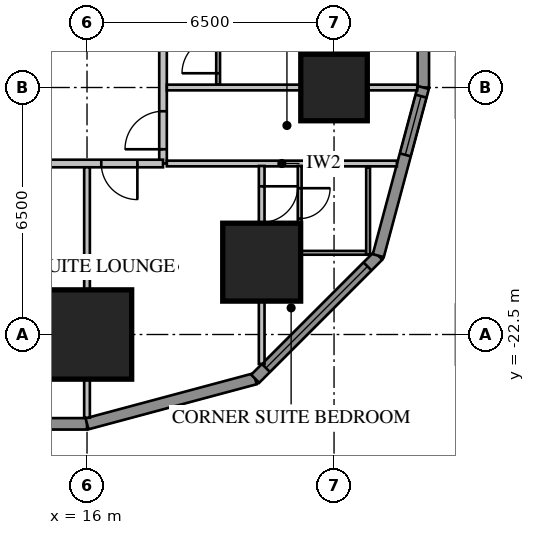
"""IFC4 building model, lengths in metres.
Left out: names, types, materials, properties, quantities, classifications, styles, units other than length and angle.
Written with IfcOpenShell. Run it as: python <this file> out.ifc"""

import sys

from ifc_helpers import new_model, si_unit, direction, frame, frame_2d, origin, origin_2d, place, context, subcontext, project, spatial, rectangle, extrude, element, fill, save


model = new_model("IFC4")
c1 = context("Model", 3, precision=1e-05, world=origin(), true_north=direction((0.0, 1.0)))
c2 = subcontext(c1, "Body", "Model", "MODEL_VIEW")
j1 = project(units=[si_unit("LENGTHUNIT", "METRE"), si_unit("PLANEANGLEUNIT", "RADIAN")], contexts=[c1])
p1 = place(None, origin())
s1 = spatial("IfcSite", under=j1, at=p1, CompositionType="ELEMENT")
p2 = place(p1, origin())
s2 = spatial("IfcBuilding", under=s1, at=p2, CompositionType="ELEMENT")
p3 = place(p2, frame((0.0, 0.0, 42.95)))
s3 = spatial("IfcBuildingStorey", under=s2, at=p3, CompositionType="ELEMENT", Elevation=42.95)
p4 = place(p3, frame((22.5, -16.0, 0.0), z_axis=(0.0, 0.0, 1.0), x_axis=(1.0, 0.0, 0.0)))
e1 = element("IfcColumn", 1, at=p4, inside=s3, PredefinedType="COLUMN", context=c2, shape_type="SweptSolid", body=[
    extrude(rectangle(XDim=1.75, YDim=1.75, at=origin_2d()), origin(), (0.0, 0.0, 1.0), 3.85),
])
p5 = place(p3, frame((16.0, -22.5, 0.0), z_axis=(0.0, 0.0, 1.0), x_axis=(1.0, 0.0, 0.0)))
e2 = element("IfcColumn", 2, at=p5, inside=s3, PredefinedType="COLUMN", context=c2, shape_type="SweptSolid", body=[
    extrude(rectangle(XDim=2.35, YDim=2.35, at=origin_2d()), origin(), (0.0, 0.0, 1.0), 3.85),
])
p6 = place(p3, frame((20.596, -20.596, 0.0), z_axis=(0.0, 0.0, 1.0), x_axis=(1.0, 0.0, 0.0)))
e3 = element("IfcColumn", 3, at=p6, inside=s3, PredefinedType="COLUMN", context=c2, shape_type="SweptSolid", body=[
    extrude(rectangle(XDim=2.05, YDim=2.05, at=origin_2d()), origin(), (0.0, 0.0, 1.0), 3.85),
])
p7 = place(p3, frame((24.85, -16.0, 0.0), z_axis=(0.0, 0.0, 1.0), x_axis=(0.0, 1.0, 0.0)))
e4 = element("IfcWall", 4, at=p7, inside=s3, PredefinedType="SOLIDWALL", context=c2, shape_type="SweptSolid", body=[
    extrude(rectangle(XDim=32.0, YDim=0.3, at=frame_2d((16.0, 0.0))), origin(), (0.0, 0.0, 1.0), 3.65),
])
p8 = place(p7, frame((1.2, 0.0, 0.75)))
e5 = element("IfcOpeningElement", 5, at=p8, cuts=e4, PredefinedType="OPENING", context=c2, shape_type="SweptSolid", body=[
    extrude(rectangle(XDim=1.6, YDim=1.8, at=frame_2d((0.8, 0.9))), frame((0.0, 0.17, 0.0), z_axis=(0.0, -1.0, 0.0), x_axis=(1.0, 0.0, 0.0)), (0.0, 0.0, 1.0), 0.34),
])
p9 = place(p7, frame((5.2, 0.0, 0.75)))
e6 = element("IfcOpeningElement", 6, at=p9, cuts=e4, PredefinedType="OPENING", context=c2, shape_type="SweptSolid", body=[
    extrude(rectangle(XDim=1.6, YDim=1.8, at=frame_2d((0.8, 0.9))), frame((0.0, 0.17, 0.0), z_axis=(0.0, -1.0, 0.0), x_axis=(1.0, 0.0, 0.0)), (0.0, 0.0, 1.0), 0.34),
])
p10 = place(p7, frame((17.2, 0.0, 0.75)))
e7 = element("IfcOpeningElement", 7, at=p10, cuts=e4, PredefinedType="OPENING", context=c2, shape_type="SweptSolid", body=[
    extrude(rectangle(XDim=1.6, YDim=1.8, at=frame_2d((0.8, 0.9))), frame((0.0, 0.17, 0.0), z_axis=(0.0, -1.0, 0.0), x_axis=(1.0, 0.0, 0.0)), (0.0, 0.0, 1.0), 0.34),
])
p11 = place(p7, frame((21.2, 0.0, 0.75)))
e8 = element("IfcOpeningElement", 8, at=p11, cuts=e4, PredefinedType="OPENING", context=c2, shape_type="SweptSolid", body=[
    extrude(rectangle(XDim=1.6, YDim=1.8, at=frame_2d((0.8, 0.9))), frame((0.0, 0.17, 0.0), z_axis=(0.0, -1.0, 0.0), x_axis=(1.0, 0.0, 0.0)), (0.0, 0.0, 1.0), 0.34),
])
p12 = place(p7, frame((25.2, 0.0, 0.75)))
e9 = element("IfcOpeningElement", 9, at=p12, cuts=e4, PredefinedType="OPENING", context=c2, shape_type="SweptSolid", body=[
    extrude(rectangle(XDim=1.6, YDim=1.8, at=frame_2d((0.8, 0.9))), frame((0.0, 0.17, 0.0), z_axis=(0.0, -1.0, 0.0), x_axis=(1.0, 0.0, 0.0)), (0.0, 0.0, 1.0), 0.34),
])
p13 = place(p7, frame((29.2, 0.0, 0.75)))
e10 = element("IfcOpeningElement", 10, at=p13, cuts=e4, PredefinedType="OPENING", context=c2, shape_type="SweptSolid", body=[
    extrude(rectangle(XDim=1.6, YDim=1.8, at=frame_2d((0.8, 0.9))), frame((0.0, 0.17, 0.0), z_axis=(0.0, -1.0, 0.0), x_axis=(1.0, 0.0, 0.0)), (0.0, 0.0, 1.0), 0.34),
])
p14 = place(p7, frame((8.8, 0.0, 0.75)))
e11 = element("IfcOpeningElement", 11, at=p14, cuts=e4, PredefinedType="OPENING", context=c2, shape_type="SweptSolid", body=[
    extrude(rectangle(XDim=2.4, YDim=1.8, at=frame_2d((1.2, 0.9))), frame((0.0, 0.17, 0.0), z_axis=(0.0, -1.0, 0.0), x_axis=(1.0, 0.0, 0.0)), (0.0, 0.0, 1.0), 0.34),
])
p15 = place(p7, frame((13.812, 0.0, 0.0)))
e12 = element("IfcOpeningElement", 12, at=p15, cuts=e4, PredefinedType="OPENING", context=c2, shape_type="SweptSolid", body=[
    extrude(rectangle(XDim=1.0, YDim=2.4, at=frame_2d((0.5, 1.2))), frame((0.0, 0.17, 0.0), z_axis=(0.0, -1.0, 0.0), x_axis=(1.0, 0.0, 0.0)), (0.0, 0.0, 1.0), 0.34),
])
p16 = place(p3, frame((-16.0, -24.85, 0.0), z_axis=(0.0, 0.0, 1.0), x_axis=(1.0, 0.0, 0.0)))
e13 = element("IfcWall", 13, at=p16, inside=s3, PredefinedType="SOLIDWALL", context=c2, shape_type="SweptSolid", body=[
    extrude(rectangle(XDim=32.0, YDim=0.3, at=frame_2d((16.0, 0.0))), origin(), (0.0, 0.0, 1.0), 3.65),
])
p17 = place(p16, frame((1.2, 0.0, 0.75)))
e14 = element("IfcOpeningElement", 14, at=p17, cuts=e13, PredefinedType="OPENING", context=c2, shape_type="SweptSolid", body=[
    extrude(rectangle(XDim=1.6, YDim=1.8, at=frame_2d((0.8, 0.9))), frame((0.0, 0.17, 0.0), z_axis=(0.0, -1.0, 0.0), x_axis=(1.0, 0.0, 0.0)), (0.0, 0.0, 1.0), 0.34),
])
p18 = place(p16, frame((5.2, 0.0, 0.75)))
e15 = element("IfcOpeningElement", 15, at=p18, cuts=e13, PredefinedType="OPENING", context=c2, shape_type="SweptSolid", body=[
    extrude(rectangle(XDim=1.6, YDim=1.8, at=frame_2d((0.8, 0.9))), frame((0.0, 0.17, 0.0), z_axis=(0.0, -1.0, 0.0), x_axis=(1.0, 0.0, 0.0)), (0.0, 0.0, 1.0), 0.34),
])
p19 = place(p16, frame((17.2, 0.0, 0.75)))
e16 = element("IfcOpeningElement", 16, at=p19, cuts=e13, PredefinedType="OPENING", context=c2, shape_type="SweptSolid", body=[
    extrude(rectangle(XDim=1.6, YDim=1.8, at=frame_2d((0.8, 0.9))), frame((0.0, 0.17, 0.0), z_axis=(0.0, -1.0, 0.0), x_axis=(1.0, 0.0, 0.0)), (0.0, 0.0, 1.0), 0.34),
])
p20 = place(p16, frame((21.2, 0.0, 0.75)))
e17 = element("IfcOpeningElement", 17, at=p20, cuts=e13, PredefinedType="OPENING", context=c2, shape_type="SweptSolid", body=[
    extrude(rectangle(XDim=1.6, YDim=1.8, at=frame_2d((0.8, 0.9))), frame((0.0, 0.17, 0.0), z_axis=(0.0, -1.0, 0.0), x_axis=(1.0, 0.0, 0.0)), (0.0, 0.0, 1.0), 0.34),
])
p21 = place(p16, frame((25.2, 0.0, 0.75)))
e18 = element("IfcOpeningElement", 18, at=p21, cuts=e13, PredefinedType="OPENING", context=c2, shape_type="SweptSolid", body=[
    extrude(rectangle(XDim=1.6, YDim=1.8, at=frame_2d((0.8, 0.9))), frame((0.0, 0.17, 0.0), z_axis=(0.0, -1.0, 0.0), x_axis=(1.0, 0.0, 0.0)), (0.0, 0.0, 1.0), 0.34),
])
p22 = place(p16, frame((29.2, 0.0, 0.75)))
e19 = element("IfcOpeningElement", 19, at=p22, cuts=e13, PredefinedType="OPENING", context=c2, shape_type="SweptSolid", body=[
    extrude(rectangle(XDim=1.6, YDim=1.8, at=frame_2d((0.8, 0.9))), frame((0.0, 0.17, 0.0), z_axis=(0.0, -1.0, 0.0), x_axis=(1.0, 0.0, 0.0)), (0.0, 0.0, 1.0), 0.34),
])
p23 = place(p16, frame((8.8, 0.0, 0.75)))
e20 = element("IfcOpeningElement", 20, at=p23, cuts=e13, PredefinedType="OPENING", context=c2, shape_type="SweptSolid", body=[
    extrude(rectangle(XDim=2.4, YDim=1.8, at=frame_2d((1.2, 0.9))), frame((0.0, 0.17, 0.0), z_axis=(0.0, -1.0, 0.0), x_axis=(1.0, 0.0, 0.0)), (0.0, 0.0, 1.0), 0.34),
])
p24 = place(p16, frame((13.812, 0.0, 0.0)))
e21 = element("IfcOpeningElement", 21, at=p24, cuts=e13, PredefinedType="OPENING", context=c2, shape_type="SweptSolid", body=[
    extrude(rectangle(XDim=1.0, YDim=2.4, at=frame_2d((0.5, 1.2))), frame((0.0, 0.17, 0.0), z_axis=(0.0, -1.0, 0.0), x_axis=(1.0, 0.0, 0.0)), (0.0, 0.0, 1.0), 0.34),
])
p25 = place(p3, frame((16.0, -24.85, 0.0), z_axis=(0.0, 0.0, 1.0), x_axis=(0.965920218567, 0.258839972501, 0.0)))
e22 = element("IfcWall", 22, at=p25, inside=s3, PredefinedType="SOLIDWALL", context=c2, shape_type="SweptSolid", body=[
    extrude(rectangle(XDim=4.581, YDim=0.3, at=frame_2d((2.291, 0.0))), origin(), (0.0, 0.0, 1.0), 3.65),
])
p26 = place(p3, frame((20.425, -23.664, 0.0), z_axis=(0.0, 0.0, 1.0), x_axis=(0.707106781187, 0.707106781187, 0.0)))
e23 = element("IfcWall", 23, at=p26, inside=s3, PredefinedType="SOLIDWALL", context=c2, shape_type="SweptSolid", body=[
    extrude(rectangle(XDim=4.581, YDim=0.3, at=frame_2d((2.291, 0.0))), origin(), (0.0, 0.0, 1.0), 3.65),
])
p27 = place(p26, frame((0.4, 0.0, 0.75)))
e24 = element("IfcOpeningElement", 24, at=p27, cuts=e23, PredefinedType="OPENING", context=c2, shape_type="SweptSolid", body=[
    extrude(rectangle(XDim=3.781, YDim=1.8, at=frame_2d((1.891, 0.9))), frame((0.0, 0.17, 0.0), z_axis=(0.0, -1.0, 0.0), x_axis=(1.0, 0.0, 0.0)), (0.0, 0.0, 1.0), 0.34),
])
p28 = place(p3, frame((23.664, -20.425, 0.0), z_axis=(0.0, 0.0, 1.0), x_axis=(0.258839972501, 0.965920218567, 0.0)))
e25 = element("IfcWall", 25, at=p28, inside=s3, PredefinedType="SOLIDWALL", context=c2, shape_type="SweptSolid", body=[
    extrude(rectangle(XDim=4.581, YDim=0.3, at=frame_2d((2.291, 0.0))), origin(), (0.0, 0.0, 1.0), 3.65),
])
p29 = place(p28, frame((2.746, 0.0, 0.75)))
e26 = element("IfcOpeningElement", 26, at=p29, cuts=e25, PredefinedType="OPENING", context=c2, shape_type="SweptSolid", body=[
    extrude(rectangle(XDim=1.6, YDim=1.8, at=frame_2d((0.8, 0.9))), frame((0.0, 0.17, 0.0), z_axis=(0.0, -1.0, 0.0), x_axis=(1.0, 0.0, 0.0)), (0.0, 0.0, 1.0), 0.34),
])
p30 = place(p3, frame((18.0, -18.0, 0.0), z_axis=(0.0, 0.0, 1.0), x_axis=(0.0, 1.0, 0.0)))
e27 = element("IfcWall", 27, at=p30, inside=s3, PredefinedType="PARTITIONING", context=c2, shape_type="SweptSolid", body=[
    extrude(rectangle(XDim=36.0, YDim=0.2, at=frame_2d((18.0, 0.0))), origin(), (0.0, 0.0, 1.0), 3.65),
])
p31 = place(p30, frame((10.4, 0.0, 0.0)))
e28 = element("IfcOpeningElement", 28, at=p31, cuts=e27, PredefinedType="OPENING", context=c2, shape_type="SweptSolid", body=[
    extrude(rectangle(XDim=1.0, YDim=2.1, at=frame_2d((0.5, 1.05))), frame((0.0, 0.12, 0.0), z_axis=(0.0, -1.0, 0.0), x_axis=(1.0, 0.0, 0.0)), (0.0, 0.0, 1.0), 0.24),
])
p32 = place(p30, frame((14.4, 0.0, 0.0)))
e29 = element("IfcOpeningElement", 29, at=p32, cuts=e27, PredefinedType="OPENING", context=c2, shape_type="SweptSolid", body=[
    extrude(rectangle(XDim=1.0, YDim=2.1, at=frame_2d((0.5, 1.05))), frame((0.0, 0.12, 0.0), z_axis=(0.0, -1.0, 0.0), x_axis=(1.0, 0.0, 0.0)), (0.0, 0.0, 1.0), 0.24),
])
p33 = place(p30, frame((0.375, 0.0, 0.0)))
e30 = element("IfcOpeningElement", 30, at=p33, cuts=e27, PredefinedType="OPENING", context=c2, shape_type="SweptSolid", body=[
    extrude(rectangle(XDim=1.0, YDim=2.1, at=frame_2d((0.5, 1.05))), frame((0.0, 0.12, 0.0), z_axis=(0.0, -1.0, 0.0), x_axis=(1.0, 0.0, 0.0)), (0.0, 0.0, 1.0), 0.24),
])
p34 = place(p30, frame((34.375, 0.0, 0.0)))
e31 = element("IfcOpeningElement", 31, at=p34, cuts=e27, PredefinedType="OPENING", context=c2, shape_type="SweptSolid", body=[
    extrude(rectangle(XDim=0.95, YDim=2.1, at=frame_2d((0.475, 1.05))), frame((0.0, 0.12, 0.0), z_axis=(0.0, -1.0, 0.0), x_axis=(1.0, 0.0, 0.0)), (0.0, 0.0, 1.0), 0.24),
])
p35 = place(p3, frame((19.45, -15.925, 0.0), z_axis=(0.0, 0.0, 1.0), x_axis=(0.0, 1.0, 0.0)))
e32 = element("IfcWall", 32, at=p35, inside=s3, PredefinedType="PARTITIONING", context=c2, shape_type="SweptSolid", body=[
    extrude(rectangle(XDim=11.85, YDim=0.1, at=frame_2d((5.925, 0.0))), origin(), (0.0, 0.0, 1.0), 3.65),
])
p36 = place(p35, frame((10.125, 0.0, 0.0)))
e33 = element("IfcOpeningElement", 33, at=p36, cuts=e32, PredefinedType="OPENING", context=c2, shape_type="SweptSolid", body=[
    extrude(rectangle(XDim=1.0, YDim=2.1, at=frame_2d((0.5, 1.05))), frame((0.0, 0.07, 0.0), z_axis=(0.0, -1.0, 0.0), x_axis=(1.0, 0.0, 0.0)), (0.0, 0.0, 1.0), 0.14),
])
p37 = place(p35, frame((8.3, 0.0, 0.0)))
e34 = element("IfcOpeningElement", 34, at=p37, cuts=e32, PredefinedType="OPENING", context=c2, shape_type="SweptSolid", body=[
    extrude(rectangle(XDim=0.8, YDim=2.1, at=frame_2d((0.4, 1.05))), frame((0.0, 0.07, 0.0), z_axis=(0.0, -1.0, 0.0), x_axis=(1.0, 0.0, 0.0)), (0.0, 0.0, 1.0), 0.14),
])
p38 = place(p35, frame((0.3, 0.0, 0.0)))
e35 = element("IfcOpeningElement", 35, at=p38, cuts=e32, PredefinedType="OPENING", context=c2, shape_type="SweptSolid", body=[
    extrude(rectangle(XDim=0.95, YDim=2.1, at=frame_2d((0.475, 1.05))), frame((0.0, 0.07, 0.0), z_axis=(0.0, -1.0, 0.0), x_axis=(1.0, 0.0, 0.0)), (0.0, 0.0, 1.0), 0.14),
])
p39 = place(p35, frame((4.3, 0.0, 0.0)))
e36 = element("IfcOpeningElement", 36, at=p39, cuts=e32, PredefinedType="OPENING", context=c2, shape_type="SweptSolid", body=[
    extrude(rectangle(XDim=0.95, YDim=2.1, at=frame_2d((0.475, 1.05))), frame((0.0, 0.07, 0.0), z_axis=(0.0, -1.0, 0.0), x_axis=(1.0, 0.0, 0.0)), (0.0, 0.0, 1.0), 0.14),
])
p40 = place(p3, frame((18.1, -18.0, 0.0), z_axis=(0.0, 0.0, 1.0), x_axis=(1.0, 0.0, 0.0)))
e37 = element("IfcWall", 37, at=p40, inside=s3, PredefinedType="PARTITIONING", context=c2, shape_type="SweptSolid", body=[
    extrude(rectangle(XDim=6.053, YDim=0.15, at=frame_2d((3.027, 0.0))), origin(), (0.0, 0.0, 1.0), 3.65),
])
p41 = place(p3, frame((18.1, -16.0, 0.0), z_axis=(0.0, 0.0, 1.0), x_axis=(1.0, 0.0, 0.0)))
e38 = element("IfcWall", 38, at=p41, inside=s3, PredefinedType="PARTITIONING", context=c2, shape_type="SweptSolid", body=[
    extrude(rectangle(XDim=6.589, YDim=0.15, at=frame_2d((3.295, 0.0))), origin(), (0.0, 0.0, 1.0), 3.65),
])
p42 = place(p3, frame((-18.0, -18.0, 0.0), z_axis=(0.0, 0.0, 1.0), x_axis=(1.0, 0.0, 0.0)))
e39 = element("IfcWall", 39, at=p42, inside=s3, PredefinedType="PARTITIONING", context=c2, shape_type="SweptSolid", body=[
    extrude(rectangle(XDim=36.0, YDim=0.2, at=frame_2d((18.0, 0.0))), origin(), (0.0, 0.0, 1.0), 3.65),
])
p43 = place(p42, frame((0.375, 0.0, 0.0)))
e40 = element("IfcOpeningElement", 40, at=p43, cuts=e39, PredefinedType="OPENING", context=c2, shape_type="SweptSolid", body=[
    extrude(rectangle(XDim=1.0, YDim=2.1, at=frame_2d((0.5, 1.05))), frame((0.0, 0.12, 0.0), z_axis=(0.0, -1.0, 0.0), x_axis=(1.0, 0.0, 0.0)), (0.0, 0.0, 1.0), 0.24),
])
p44 = place(p42, frame((2.45, 0.0, 0.0)))
e41 = element("IfcOpeningElement", 41, at=p44, cuts=e39, PredefinedType="OPENING", context=c2, shape_type="SweptSolid", body=[
    extrude(rectangle(XDim=0.8, YDim=2.1, at=frame_2d((0.4, 1.05))), frame((0.0, 0.12, 0.0), z_axis=(0.0, -1.0, 0.0), x_axis=(1.0, 0.0, 0.0)), (0.0, 0.0, 1.0), 0.24),
])
p45 = place(p42, frame((4.05, 0.0, 0.0)))
e42 = element("IfcOpeningElement", 42, at=p45, cuts=e39, PredefinedType="OPENING", context=c2, shape_type="SweptSolid", body=[
    extrude(rectangle(XDim=1.0, YDim=2.1, at=frame_2d((0.5, 1.05))), frame((0.0, 0.12, 0.0), z_axis=(0.0, -1.0, 0.0), x_axis=(1.0, 0.0, 0.0)), (0.0, 0.0, 1.0), 0.24),
])
p46 = place(p42, frame((6.45, 0.0, 0.0)))
e43 = element("IfcOpeningElement", 43, at=p46, cuts=e39, PredefinedType="OPENING", context=c2, shape_type="SweptSolid", body=[
    extrude(rectangle(XDim=0.9, YDim=2.1, at=frame_2d((0.45, 1.05))), frame((0.0, 0.12, 0.0), z_axis=(0.0, -1.0, 0.0), x_axis=(1.0, 0.0, 0.0)), (0.0, 0.0, 1.0), 0.24),
])
p47 = place(p42, frame((8.15, 0.0, 0.0)))
e44 = element("IfcOpeningElement", 44, at=p47, cuts=e39, PredefinedType="OPENING", context=c2, shape_type="SweptSolid", body=[
    extrude(rectangle(XDim=1.0, YDim=2.1, at=frame_2d((0.5, 1.05))), frame((0.0, 0.12, 0.0), z_axis=(0.0, -1.0, 0.0), x_axis=(1.0, 0.0, 0.0)), (0.0, 0.0, 1.0), 0.24),
])
p48 = place(p42, frame((19.95, 0.0, 0.0)))
e45 = element("IfcOpeningElement", 45, at=p48, cuts=e39, PredefinedType="OPENING", context=c2, shape_type="SweptSolid", body=[
    extrude(rectangle(XDim=0.95, YDim=2.1, at=frame_2d((0.475, 1.05))), frame((0.0, 0.12, 0.0), z_axis=(0.0, -1.0, 0.0), x_axis=(1.0, 0.0, 0.0)), (0.0, 0.0, 1.0), 0.24),
])
p49 = place(p42, frame((23.95, 0.0, 0.0)))
e46 = element("IfcOpeningElement", 46, at=p49, cuts=e39, PredefinedType="OPENING", context=c2, shape_type="SweptSolid", body=[
    extrude(rectangle(XDim=0.95, YDim=2.1, at=frame_2d((0.475, 1.05))), frame((0.0, 0.12, 0.0), z_axis=(0.0, -1.0, 0.0), x_axis=(1.0, 0.0, 0.0)), (0.0, 0.0, 1.0), 0.24),
])
p50 = place(p42, frame((27.95, 0.0, 0.0)))
e47 = element("IfcOpeningElement", 47, at=p50, cuts=e39, PredefinedType="OPENING", context=c2, shape_type="SweptSolid", body=[
    extrude(rectangle(XDim=0.95, YDim=2.1, at=frame_2d((0.475, 1.05))), frame((0.0, 0.12, 0.0), z_axis=(0.0, -1.0, 0.0), x_axis=(1.0, 0.0, 0.0)), (0.0, 0.0, 1.0), 0.24),
])
p51 = place(p42, frame((31.95, 0.0, 0.0)))
e48 = element("IfcOpeningElement", 48, at=p51, cuts=e39, PredefinedType="OPENING", context=c2, shape_type="SweptSolid", body=[
    extrude(rectangle(XDim=0.95, YDim=2.1, at=frame_2d((0.475, 1.05))), frame((0.0, 0.12, 0.0), z_axis=(0.0, -1.0, 0.0), x_axis=(1.0, 0.0, 0.0)), (0.0, 0.0, 1.0), 0.24),
])
p52 = place(p42, frame((34.375, 0.0, 0.0)))
e49 = element("IfcOpeningElement", 49, at=p52, cuts=e39, PredefinedType="OPENING", context=c2, shape_type="SweptSolid", body=[
    extrude(rectangle(XDim=0.95, YDim=2.1, at=frame_2d((0.475, 1.05))), frame((0.0, 0.12, 0.0), z_axis=(0.0, -1.0, 0.0), x_axis=(1.0, 0.0, 0.0)), (0.0, 0.0, 1.0), 0.24),
])
p53 = place(p42, frame((11.2, 0.0, 0.0)))
e50 = element("IfcOpeningElement", 50, at=p53, cuts=e39, PredefinedType="OPENING", context=c2, shape_type="SweptSolid", body=[
    extrude(rectangle(XDim=1.0, YDim=2.1, at=frame_2d((0.5, 1.05))), frame((0.0, 0.12, 0.0), z_axis=(0.0, -1.0, 0.0), x_axis=(1.0, 0.0, 0.0)), (0.0, 0.0, 1.0), 0.24),
])
p54 = place(p3, frame((16.0, -18.1, 0.0), z_axis=(0.0, 0.0, 1.0), x_axis=(0.0, -1.0, 0.0)))
e51 = element("IfcWall", 51, at=p54, inside=s3, PredefinedType="PARTITIONING", context=c2, shape_type="SweptSolid", body=[
    extrude(rectangle(XDim=6.589, YDim=0.15, at=frame_2d((3.295, 0.0))), origin(), (0.0, 0.0, 1.0), 3.65),
])
p55 = place(p3, frame((21.596, -18.065, 0.0), z_axis=(0.0, 0.0, 1.0), x_axis=(0.0, -1.0, 0.0)))
e52 = element("IfcWall", 52, at=p55, inside=s3, PredefinedType="PARTITIONING", context=c2, shape_type="SweptSolid", body=[
    extrude(rectangle(XDim=2.335, YDim=0.1, at=frame_2d((1.167, 0.0))), origin(), (0.0, 0.0, 1.0), 3.65),
])
p56 = place(p55, frame((0.585, 0.0, 0.0)))
e53 = element("IfcOpeningElement", 53, at=p56, cuts=e52, PredefinedType="OPENING", context=c2, shape_type="SweptSolid", body=[
    extrude(rectangle(XDim=0.8, YDim=2.1, at=frame_2d((0.4, 1.05))), frame((0.0, 0.07, 0.0), z_axis=(0.0, -1.0, 0.0), x_axis=(1.0, 0.0, 0.0)), (0.0, 0.0, 1.0), 0.14),
])
p57 = place(p3, frame((21.646, -20.35, 0.0), z_axis=(0.0, 0.0, 1.0), x_axis=(1.0, 0.0, 0.0)))
e54 = element("IfcWall", 54, at=p57, inside=s3, PredefinedType="PARTITIONING", context=c2, shape_type="SweptSolid", body=[
    extrude(rectangle(XDim=1.7, YDim=0.1, at=frame_2d((0.85, 0.0))), origin(), (0.0, 0.0, 1.0), 3.65),
])
p58 = place(p3, frame((23.396, -18.1, 0.0), z_axis=(0.0, 0.0, 1.0), x_axis=(0.0, -1.0, 0.0)))
e55 = element("IfcWall", 55, at=p58, inside=s3, PredefinedType="PARTITIONING", context=c2, shape_type="SweptSolid", body=[
    extrude(rectangle(XDim=2.3, YDim=0.1, at=frame_2d((1.15, 0.0))), origin(), (0.0, 0.0, 1.0), 3.65),
])
p59 = place(p3, frame((20.596, -18.065, 0.0), z_axis=(0.0, 0.0, 1.0), x_axis=(0.0, -1.0, 0.0)))
e56 = element("IfcWall", 56, at=p59, inside=s3, PredefinedType="PARTITIONING", context=c2, shape_type="SweptSolid", body=[
    extrude(rectangle(XDim=5.209, YDim=0.15, at=frame_2d((2.604, 0.0))), origin(), (0.0, 0.0, 1.0), 3.65),
])
p60 = place(p59, frame((0.535, 0.0, 0.0)))
e57 = element("IfcOpeningElement", 57, at=p60, cuts=e56, PredefinedType="OPENING", context=c2, shape_type="SweptSolid", body=[
    extrude(rectangle(XDim=0.95, YDim=2.1, at=frame_2d((0.475, 1.05))), frame((0.0, 0.095, 0.0), z_axis=(0.0, -1.0, 0.0), x_axis=(1.0, 0.0, 0.0)), (0.0, 0.0, 1.0), 0.19),
])
p61 = place(p29, origin())
e58 = element("IfcWindow", 58, at=p61, inside=s3, PartitioningType="SINGLE_PANEL", PredefinedType="WINDOW", context=c2, shape_type="SweptSolid", body=[
    extrude(rectangle(XDim=1.6, YDim=1.8, at=frame_2d((0.8, 0.9))), frame((0.0, 0.03, 0.0), z_axis=(0.0, -1.0, 0.0), x_axis=(1.0, 0.0, 0.0)), (0.0, 0.0, 1.0), 0.06),
])
fill(e26, e58)
p62 = place(p27, origin())
e59 = element("IfcWindow", 59, at=p62, inside=s3, PartitioningType="SINGLE_PANEL", PredefinedType="WINDOW", context=c2, shape_type="SweptSolid", body=[
    extrude(rectangle(XDim=3.781, YDim=1.8, at=frame_2d((1.891, 0.9))), frame((0.0, 0.03, 0.0), z_axis=(0.0, -1.0, 0.0), x_axis=(1.0, 0.0, 0.0)), (0.0, 0.0, 1.0), 0.06),
])
fill(e24, e59)
p63 = place(p33, origin())
e60 = element("IfcDoor", 60, at=p63, inside=s3, OperationType="SINGLE_SWING_LEFT", PredefinedType="DOOR", context=c2, shape_type="SweptSolid", body=[
    extrude(rectangle(XDim=1.0, YDim=2.1, at=frame_2d((0.5, 1.05))), frame((0.0, 0.025, 0.0), z_axis=(0.0, -1.0, 0.0), x_axis=(1.0, 0.0, 0.0)), (0.0, 0.0, 1.0), 0.05),
])
fill(e30, e60)
p64 = place(p38, origin())
e61 = element("IfcDoor", 61, at=p64, inside=s3, OperationType="SINGLE_SWING_LEFT", PredefinedType="DOOR", context=c2, shape_type="SweptSolid", body=[
    extrude(rectangle(XDim=0.95, YDim=2.1, at=frame_2d((0.475, 1.05))), frame((0.0, 0.025, 0.0), z_axis=(0.0, -1.0, 0.0), x_axis=(1.0, 0.0, 0.0)), (0.0, 0.0, 1.0), 0.05),
])
fill(e35, e61)
p65 = place(p52, origin())
e62 = element("IfcDoor", 62, at=p65, inside=s3, OperationType="SINGLE_SWING_RIGHT", PredefinedType="DOOR", context=c2, shape_type="SweptSolid", body=[
    extrude(rectangle(XDim=0.95, YDim=2.1, at=frame_2d((0.475, 1.05))), frame((0.0, 0.025, 0.0), z_axis=(0.0, -1.0, 0.0), x_axis=(1.0, 0.0, 0.0)), (0.0, 0.0, 1.0), 0.05),
])
fill(e49, e62)
p66 = place(p56, origin())
e63 = element("IfcDoor", 63, at=p66, inside=s3, OperationType="SINGLE_SWING_LEFT", PredefinedType="DOOR", context=c2, shape_type="SweptSolid", body=[
    extrude(rectangle(XDim=0.8, YDim=2.1, at=frame_2d((0.4, 1.05))), frame((0.0, 0.025, 0.0), z_axis=(0.0, -1.0, 0.0), x_axis=(1.0, 0.0, 0.0)), (0.0, 0.0, 1.0), 0.05),
])
fill(e53, e63)
p67 = place(p60, origin())
e64 = element("IfcDoor", 64, at=p67, inside=s3, OperationType="SINGLE_SWING_LEFT", PredefinedType="DOOR", context=c2, shape_type="SweptSolid", body=[
    extrude(rectangle(XDim=0.95, YDim=2.1, at=frame_2d((0.475, 1.05))), frame((0.0, 0.025, 0.0), z_axis=(0.0, -1.0, 0.0), x_axis=(1.0, 0.0, 0.0)), (0.0, 0.0, 1.0), 0.05),
])
fill(e57, e64)
save(model, sys.argv[1])
